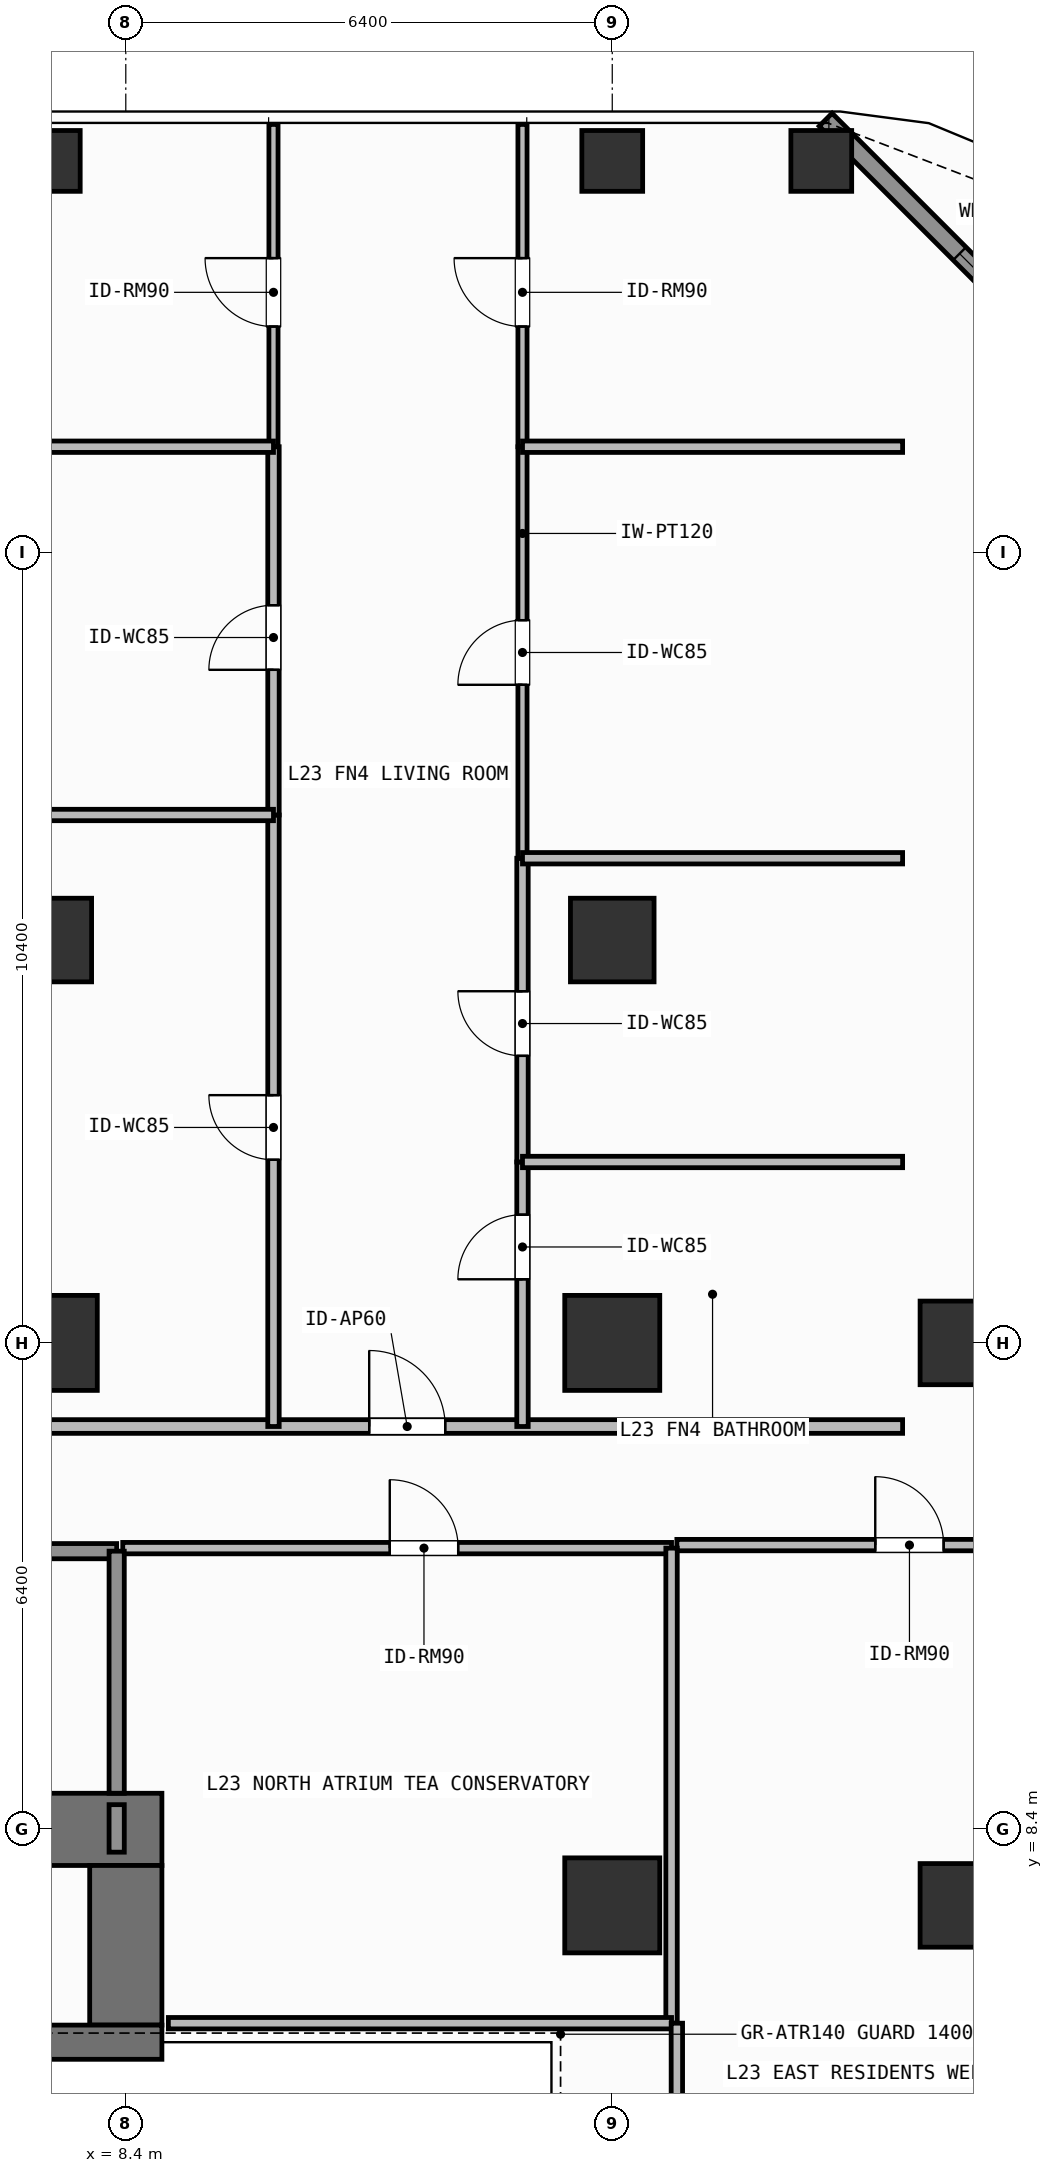
"""IFC4 building model, lengths in metres.
Left out: names, types, materials, properties, quantities, classifications, styles, units other than length and angle.
Written with IfcOpenShell. Run it as: python <this file> out.ifc"""

import sys

from ifc_helpers import new_model, si_unit, direction, frame, frame_2d, origin, origin_2d, place, context, subcontext, project, spatial, rectangle, hollow_rectangle, extrude, element, fill, save


model = new_model("IFC4")
c1 = context("Model", 3, precision=1e-05, world=origin(), true_north=direction((0.0, 1.0)))
c2 = subcontext(c1, "Body", "Model", "MODEL_VIEW")
j1 = project(units=[si_unit("LENGTHUNIT", "METRE"), si_unit("PLANEANGLEUNIT", "RADIAN")], contexts=[c1])
p1 = place(None, origin())
s1 = spatial("IfcSite", under=j1, at=p1, CompositionType="ELEMENT")
p2 = place(p1, origin())
s2 = spatial("IfcBuilding", under=s1, at=p2, CompositionType="ELEMENT")
p3 = place(p2, frame((0.0, 0.0, 93.0)))
s3 = spatial("IfcBuildingStorey", under=s2, at=p3, CompositionType="ELEMENT", Elevation=93.0)
p4 = place(p3, frame((-7.55, 8.4, 0.0), z_axis=(0.0, 0.0, 1.0), x_axis=(1.0, 0.0, 0.0)))
e1 = element("IfcWall", 1, at=p4, inside=s3, PredefinedType="SHEAR", context=c2, shape_type="SweptSolid", body=[
    extrude(rectangle(XDim=16.425, YDim=0.95, at=frame_2d((8.212, 0.0))), origin(), (0.0, 0.0, 1.0), 3.9),
])
p5 = place(p3, frame((8.4, 5.825, 0.0), z_axis=(0.0, 0.0, 1.0), x_axis=(0.0, 1.0, 0.0)))
e2 = element("IfcWall", 2, at=p5, inside=s3, PredefinedType="SHEAR", context=c2, shape_type="SweptSolid", body=[
    extrude(rectangle(XDim=2.1, YDim=0.95, at=frame_2d((1.05, 0.0))), origin(), (0.0, 0.0, 1.0), 3.9),
])
p6 = place(p3, frame((3.045, 5.6, 0.0), z_axis=(0.0, 0.0, 1.0), x_axis=(1.0, 0.0, 0.0)))
e3 = element("IfcWall", 3, at=p6, inside=s3, PredefinedType="SHEAR", context=c2, shape_type="SweptSolid", body=[
    extrude(rectangle(XDim=5.83, YDim=0.45, at=frame_2d((2.915, 0.0))), origin(), (0.0, 0.0, 1.0), 3.9),
])
for number, where, z_axis, x_axis in (
    (4, (7.4, 14.8, 0.0), (0.0, 0.0, 1.0), (1.0, 0.0, 0.0)),
    (5, (14.8, 14.8, 0.0), (0.0, 0.0, 1.0), (1.0, 0.0, 0.0)),
    (6, (14.8, 7.4, 0.0), (0.0, 0.0, 1.0), (1.0, 0.0, 0.0)),
):
    element("IfcColumn", number, at=place(p3, frame(where, z_axis=z_axis, x_axis=x_axis)), inside=s3, PredefinedType="COLUMN", context=c2, shape_type="SweptSolid", body=[
        extrude(rectangle(XDim=1.25, YDim=1.25, at=origin_2d()), origin(), (0.0, 0.0, 1.0), 3.9),
    ])
for number, where, z_axis, x_axis in (
    (7, (19.4, 7.4, 0.0), (0.0, 0.0, 1.0), (1.0, 0.0, 0.0)),
    (8, (19.4, 14.8, 0.0), (0.0, 0.0, 1.0), (1.0, 0.0, 0.0)),
    (9, (7.4, 20.1, 0.0), (0.0, 0.0, 1.0), (1.0, 0.0, 0.0)),
    (10, (14.8, 20.1, 0.0), (0.0, 0.0, 1.0), (1.0, 0.0, 0.0)),
):
    element("IfcColumn", number, at=place(p3, frame(where, z_axis=z_axis, x_axis=x_axis)), inside=s3, PredefinedType="COLUMN", context=c2, shape_type="SweptSolid", body=[
        extrude(rectangle(XDim=1.1, YDim=1.1, at=origin_2d()), origin(), (0.0, 0.0, 1.0), 3.9),
    ])
for number, where, z_axis, x_axis in (
    (11, (17.55, 30.35, 0.0), (0.0, 0.0, 1.0), (1.0, 0.0, 0.0)),
    (12, (7.4, 30.35, 0.0), (0.0, 0.0, 1.0), (1.0, 0.0, 0.0)),
    (13, (14.8, 30.35, 0.0), (0.0, 0.0, 1.0), (1.0, 0.0, 0.0)),
):
    element("IfcColumn", number, at=place(p3, frame(where, z_axis=z_axis, x_axis=x_axis)), inside=s3, PredefinedType="COLUMN", context=c2, shape_type="SweptSolid", body=[
        extrude(hollow_rectangle(XDim=0.8, YDim=0.8, WallThickness=0.036, at=origin_2d()), origin(), (0.0, 0.0, 1.0), 3.9),
    ])
p7 = place(p3, frame((17.608, 30.892, 0.0), z_axis=(0.0, 0.0, 1.0), x_axis=(0.707106781187, -0.707106781187, 0.0)))
e14 = element("IfcWall", 14, at=p7, inside=s3, PredefinedType="SOLIDWALL", context=c2, shape_type="SweptSolid", body=[
    extrude(rectangle(XDim=6.484, YDim=0.24, at=frame_2d((3.242, 0.0))), origin(), (0.0, 0.0, 1.0), 3.68),
])
p8 = place(p7, frame((2.492, 0.0, 0.8)))
e15 = element("IfcOpeningElement", 15, at=p8, cuts=e14, PredefinedType="OPENING", context=c2, shape_type="SweptSolid", body=[
    extrude(rectangle(XDim=1.5, YDim=1.85, at=frame_2d((0.75, 0.925))), frame((0.0, 0.13, 0.0), z_axis=(0.0, -1.0, 0.0), x_axis=(1.0, 0.0, 0.0)), (0.0, 0.0, 1.0), 0.26),
])
p9 = place(p3, frame((4.58, 12.06, 0.0), z_axis=(0.0, 0.0, 1.0), x_axis=(1.0, 0.0, 0.0)))
e16 = element("IfcWall", 16, at=p9, inside=s3, PredefinedType="SOLIDWALL", context=c2, shape_type="SweptSolid", body=[
    extrude(rectangle(XDim=3.7, YDim=0.2, at=frame_2d((1.85, 0.0))), origin(), (0.0, 0.0, 1.0), 3.68),
])
p10 = place(p9, frame((1.212, 0.0, 0.0)))
e17 = element("IfcOpeningElement", 17, at=p10, cuts=e16, PredefinedType="OPENING", context=c2, shape_type="SweptSolid", body=[
    extrude(rectangle(XDim=1.1, YDim=2.15, at=frame_2d((0.55, 1.075))), frame((0.0, 0.11, 0.0), z_axis=(0.0, -1.0, 0.0), x_axis=(1.0, 0.0, 0.0)), (0.0, 0.0, 1.0), 0.22),
])
p11 = place(p3, frame((8.36, 12.1, 0.0), z_axis=(0.0, 0.0, 1.0), x_axis=(1.0, 0.0, 0.0)))
e18 = element("IfcWall", 18, at=p11, inside=s3, PredefinedType="PARTITIONING", context=c2, shape_type="SweptSolid", body=[
    extrude(rectangle(XDim=7.22, YDim=0.15, at=frame_2d((3.61, 0.0))), origin(), (0.0, 0.0, 1.0), 3.68),
])
p12 = place(p11, frame((3.513, 0.0, 0.0)))
e19 = element("IfcOpeningElement", 19, at=p12, cuts=e18, PredefinedType="OPENING", context=c2, shape_type="SweptSolid", body=[
    extrude(rectangle(XDim=0.9, YDim=2.1, at=frame_2d((0.45, 1.05))), frame((0.0, 0.085, 0.0), z_axis=(0.0, -1.0, 0.0), x_axis=(1.0, 0.0, 0.0)), (0.0, 0.0, 1.0), 0.17),
])
p13 = place(p3, frame((6.117, 13.7, 0.0), z_axis=(0.0, 0.0, 1.0), x_axis=(1.0, 0.0, 0.0)))
e20 = element("IfcWall", 20, at=p13, inside=s3, PredefinedType="PARTITIONING", context=c2, shape_type="SweptSolid", body=[
    extrude(rectangle(XDim=12.503, YDim=0.18, at=frame_2d((6.251, 0.0))), origin(), (0.0, 0.0, 1.0), 3.68),
])
p14 = place(p13, frame((5.485, 0.0, 0.0)))
e21 = element("IfcOpeningElement", 21, at=p14, cuts=e20, PredefinedType="OPENING", context=c2, shape_type="SweptSolid", body=[
    extrude(rectangle(XDim=1.0, YDim=2.2, at=frame_2d((0.5, 1.1))), frame((0.0, 0.1, 0.0), z_axis=(0.0, -1.0, 0.0), x_axis=(1.0, 0.0, 0.0)), (0.0, 0.0, 1.0), 0.2),
])
p15 = place(p3, frame((10.343, 13.7, 0.0), z_axis=(0.0, 0.0, 1.0), x_axis=(0.0, 1.0, 0.0)))
e22 = element("IfcWall", 22, at=p15, inside=s3, PredefinedType="PARTITIONING", context=c2, shape_type="SweptSolid", body=[
    extrude(rectangle(XDim=8.045, YDim=0.15, at=frame_2d((4.022, 0.0))), origin(), (0.0, 0.0, 1.0), 3.68),
])
p16 = place(p15, frame((3.51, 0.0, 0.0)))
e23 = element("IfcOpeningElement", 23, at=p16, cuts=e22, PredefinedType="OPENING", context=c2, shape_type="SweptSolid", body=[
    extrude(rectangle(XDim=0.85, YDim=2.1, at=frame_2d((0.425, 1.05))), frame((0.0, 0.085, 0.0), z_axis=(0.0, -1.0, 0.0), x_axis=(1.0, 0.0, 0.0)), (0.0, 0.0, 1.0), 0.17),
])
p17 = place(p3, frame((10.343, 21.745, 0.0), z_axis=(0.0, 0.0, 1.0), x_axis=(0.0, 1.0, 0.0)))
e24 = element("IfcWall", 24, at=p17, inside=s3, PredefinedType="PARTITIONING", context=c2, shape_type="SweptSolid", body=[
    extrude(rectangle(XDim=4.845, YDim=0.15, at=frame_2d((2.422, 0.0))), origin(), (0.0, 0.0, 1.0), 3.68),
])
p18 = place(p17, frame((1.91, 0.0, 0.0)))
e25 = element("IfcOpeningElement", 25, at=p18, cuts=e24, PredefinedType="OPENING", context=c2, shape_type="SweptSolid", body=[
    extrude(rectangle(XDim=0.85, YDim=2.1, at=frame_2d((0.425, 1.05))), frame((0.0, 0.085, 0.0), z_axis=(0.0, -1.0, 0.0), x_axis=(1.0, 0.0, 0.0)), (0.0, 0.0, 1.0), 0.17),
])
p19 = place(p3, frame((10.343, 26.59, 0.0), z_axis=(0.0, 0.0, 1.0), x_axis=(0.0, 1.0, 0.0)))
e26 = element("IfcWall", 26, at=p19, inside=s3, PredefinedType="PARTITIONING", context=c2, shape_type="SweptSolid", body=[
    extrude(rectangle(XDim=4.24, YDim=0.12, at=frame_2d((2.12, 0.0))), origin(), (0.0, 0.0, 1.0), 3.68),
])
p20 = place(p19, frame((1.581, 0.0, 0.0)))
e27 = element("IfcOpeningElement", 27, at=p20, cuts=e26, PredefinedType="OPENING", context=c2, shape_type="SweptSolid", body=[
    extrude(rectangle(XDim=0.9, YDim=2.1, at=frame_2d((0.45, 1.05))), frame((0.0, 0.07, 0.0), z_axis=(0.0, -1.0, 0.0), x_axis=(1.0, 0.0, 0.0)), (0.0, 0.0, 1.0), 0.14),
])
p21 = place(p3, frame((13.619, 13.7, 0.0), z_axis=(0.0, 0.0, 1.0), x_axis=(0.0, 1.0, 0.0)))
e28 = element("IfcWall", 28, at=p21, inside=s3, PredefinedType="PARTITIONING", context=c2, shape_type="SweptSolid", body=[
    extrude(rectangle(XDim=3.48, YDim=0.15, at=frame_2d((1.74, 0.0))), origin(), (0.0, 0.0, 1.0), 3.68),
])
p22 = place(p21, frame((1.937, 0.0, 0.0)))
e29 = element("IfcOpeningElement", 29, at=p22, cuts=e28, PredefinedType="OPENING", context=c2, shape_type="SweptSolid", body=[
    extrude(rectangle(XDim=0.85, YDim=2.1, at=frame_2d((0.425, 1.05))), frame((0.0, 0.085, 0.0), z_axis=(0.0, -1.0, 0.0), x_axis=(1.0, 0.0, 0.0)), (0.0, 0.0, 1.0), 0.17),
])
p23 = place(p3, frame((13.619, 17.18, 0.0), z_axis=(0.0, 0.0, 1.0), x_axis=(0.0, 1.0, 0.0)))
e30 = element("IfcWall", 30, at=p23, inside=s3, PredefinedType="PARTITIONING", context=c2, shape_type="SweptSolid", body=[
    extrude(rectangle(XDim=3.996, YDim=0.15, at=frame_2d((1.998, 0.0))), origin(), (0.0, 0.0, 1.0), 3.68),
])
p24 = place(p23, frame((1.396, 0.0, 0.0)))
e31 = element("IfcOpeningElement", 31, at=p24, cuts=e30, PredefinedType="OPENING", context=c2, shape_type="SweptSolid", body=[
    extrude(rectangle(XDim=0.85, YDim=2.1, at=frame_2d((0.425, 1.05))), frame((0.0, 0.085, 0.0), z_axis=(0.0, -1.0, 0.0), x_axis=(1.0, 0.0, 0.0)), (0.0, 0.0, 1.0), 0.17),
])
p25 = place(p3, frame((13.619, 21.176, 0.0), z_axis=(0.0, 0.0, 1.0), x_axis=(0.0, 1.0, 0.0)))
e32 = element("IfcWall", 32, at=p25, inside=s3, PredefinedType="PARTITIONING", context=c2, shape_type="SweptSolid", body=[
    extrude(rectangle(XDim=5.414, YDim=0.12, at=frame_2d((2.707, 0.0))), origin(), (0.0, 0.0, 1.0), 3.68),
])
p26 = place(p25, frame((2.282, 0.0, 0.0)))
e33 = element("IfcOpeningElement", 33, at=p26, cuts=e32, PredefinedType="OPENING", context=c2, shape_type="SweptSolid", body=[
    extrude(rectangle(XDim=0.85, YDim=2.1, at=frame_2d((0.425, 1.05))), frame((0.0, 0.07, 0.0), z_axis=(0.0, -1.0, 0.0), x_axis=(1.0, 0.0, 0.0)), (0.0, 0.0, 1.0), 0.14),
])
p27 = place(p3, frame((13.619, 26.59, 0.0), z_axis=(0.0, 0.0, 1.0), x_axis=(0.0, 1.0, 0.0)))
e34 = element("IfcWall", 34, at=p27, inside=s3, PredefinedType="PARTITIONING", context=c2, shape_type="SweptSolid", body=[
    extrude(rectangle(XDim=4.24, YDim=0.12, at=frame_2d((2.12, 0.0))), origin(), (0.0, 0.0, 1.0), 3.68),
])
p28 = place(p27, frame((1.581, 0.0, 0.0)))
e35 = element("IfcOpeningElement", 35, at=p28, cuts=e34, PredefinedType="OPENING", context=c2, shape_type="SweptSolid", body=[
    extrude(rectangle(XDim=0.9, YDim=2.1, at=frame_2d((0.45, 1.05))), frame((0.0, 0.07, 0.0), z_axis=(0.0, -1.0, 0.0), x_axis=(1.0, 0.0, 0.0)), (0.0, 0.0, 1.0), 0.14),
])
p29 = place(p3, frame((15.65, 12.14, 0.0), z_axis=(0.0, 0.0, 1.0), x_axis=(1.0, 0.0, 0.0)))
e36 = element("IfcWall", 36, at=p29, inside=s3, PredefinedType="PARTITIONING", context=c2, shape_type="SweptSolid", body=[
    extrude(rectangle(XDim=6.47, YDim=0.15, at=frame_2d((3.235, 0.0))), origin(), (0.0, 0.0, 1.0), 3.68),
])
p30 = place(p29, frame((2.61, 0.0, 0.0)))
e37 = element("IfcOpeningElement", 37, at=p30, cuts=e36, PredefinedType="OPENING", context=c2, shape_type="SweptSolid", body=[
    extrude(rectangle(XDim=0.9, YDim=2.1, at=frame_2d((0.45, 1.05))), frame((0.0, 0.085, 0.0), z_axis=(0.0, -1.0, 0.0), x_axis=(1.0, 0.0, 0.0)), (0.0, 0.0, 1.0), 0.17),
])
p31 = place(p3, frame((8.28, 8.875, 0.0), z_axis=(0.0, 0.0, 1.0), x_axis=(0.0, 1.0, 0.0)))
e38 = element("IfcWall", 38, at=p31, inside=s3, PredefinedType="SOLIDWALL", context=c2, shape_type="SweptSolid", body=[
    extrude(rectangle(XDim=3.185, YDim=0.2, at=frame_2d((1.593, 0.0))), origin(), (0.0, 0.0, 1.0), 3.68),
])
p32 = place(p3, frame((8.28, 8.1, 0.0), z_axis=(0.0, 0.0, 1.0), x_axis=(0.0, 1.0, 0.0)))
e39 = element("IfcWall", 39, at=p32, inside=s3, PredefinedType="SOLIDWALL", context=c2, shape_type="SweptSolid", body=[
    extrude(rectangle(XDim=0.625, YDim=0.2, at=frame_2d((0.312, 0.0))), origin(), (0.0, 0.0, 1.0), 3.68),
])
p33 = place(p3, frame((15.58, 5.85, 0.0), z_axis=(0.0, 0.0, 1.0), x_axis=(0.0, 1.0, 0.0)))
e40 = element("IfcWall", 40, at=p33, inside=s3, PredefinedType="PARTITIONING", context=c2, shape_type="SweptSolid", body=[
    extrude(rectangle(XDim=6.25, YDim=0.15, at=frame_2d((3.125, 0.0))), origin(), (0.0, 0.0, 1.0), 3.68),
])
p34 = place(p3, frame((8.96, 5.85, 0.0), z_axis=(0.0, 0.0, 1.0), x_axis=(1.0, 0.0, 0.0)))
e41 = element("IfcWall", 41, at=p34, inside=s3, PredefinedType="PARTITIONING", context=c2, shape_type="SweptSolid", body=[
    extrude(rectangle(XDim=6.62, YDim=0.15, at=frame_2d((3.31, 0.0))), origin(), (0.0, 0.0, 1.0), 3.68),
])
for number, where, z_axis, x_axis in (
    (42, (6.117, 21.745, 0.0), (0.0, 0.0, 1.0), (1.0, 0.0, 0.0)),
    (43, (6.117, 26.59, 0.0), (0.0, 0.0, 1.0), (1.0, 0.0, 0.0)),
):
    element("IfcWall", number, at=place(p3, frame(where, z_axis=z_axis, x_axis=x_axis)), inside=s3, PredefinedType="PARTITIONING", context=c2, shape_type="SweptSolid", body=[
        extrude(rectangle(XDim=4.226, YDim=0.15, at=frame_2d((2.113, 0.0))), origin(), (0.0, 0.0, 1.0), 3.68),
    ])
for number, where, z_axis, x_axis in (
    (44, (13.619, 17.18, 0.0), (0.0, 0.0, 1.0), (1.0, 0.0, 0.0)),
    (45, (13.619, 21.176, 0.0), (0.0, 0.0, 1.0), (1.0, 0.0, 0.0)),
    (46, (13.619, 26.59, 0.0), (0.0, 0.0, 1.0), (1.0, 0.0, 0.0)),
):
    element("IfcWall", number, at=place(p3, frame(where, z_axis=z_axis, x_axis=x_axis)), inside=s3, PredefinedType="PARTITIONING", context=c2, shape_type="SweptSolid", body=[
        extrude(rectangle(XDim=5.001, YDim=0.15, at=frame_2d((2.5, 0.0))), origin(), (0.0, 0.0, 1.0), 3.68),
    ])
p35 = place(p3, frame((15.65, -1.8, 0.0), z_axis=(0.0, 0.0, 1.0), x_axis=(0.0, 1.0, 0.0)))
e47 = element("IfcWall", 47, at=p35, inside=s3, PredefinedType="PARTITIONING", context=c2, shape_type="SweptSolid", body=[
    extrude(rectangle(XDim=7.65, YDim=0.15, at=frame_2d((3.825, 0.0))), origin(), (0.0, 0.0, 1.0), 3.68),
])
p36 = place(p8, origin())
e48 = element("IfcWindow", 48, at=p36, inside=s3, PartitioningType="SINGLE_PANEL", PredefinedType="WINDOW", context=c2, shape_type="SweptSolid", body=[
    extrude(rectangle(XDim=1.5, YDim=1.85, at=frame_2d((0.75, 0.925))), frame((0.0, 0.03, 0.0), z_axis=(0.0, -1.0, 0.0), x_axis=(1.0, 0.0, 0.0)), (0.0, 0.0, 1.0), 0.06),
])
fill(e15, e48)
p37 = place(p12, origin())
e49 = element("IfcDoor", 49, at=p37, inside=s3, OperationType="SINGLE_SWING_LEFT", PredefinedType="DOOR", context=c2, shape_type="SweptSolid", body=[
    extrude(rectangle(XDim=0.9, YDim=2.1, at=frame_2d((0.45, 1.05))), frame((0.0, 0.025, 0.0), z_axis=(0.0, -1.0, 0.0), x_axis=(1.0, 0.0, 0.0)), (0.0, 0.0, 1.0), 0.05),
])
fill(e19, e49)
p38 = place(p14, origin())
e50 = element("IfcDoor", 50, at=p38, inside=s3, OperationType="SINGLE_SWING_LEFT", PredefinedType="DOOR", context=c2, shape_type="SweptSolid", body=[
    extrude(rectangle(XDim=1.0, YDim=2.2, at=frame_2d((0.5, 1.1))), frame((0.0, 0.025, 0.0), z_axis=(0.0, -1.0, 0.0), x_axis=(1.0, 0.0, 0.0)), (0.0, 0.0, 1.0), 0.05),
])
fill(e21, e50)
p39 = place(p16, origin())
e51 = element("IfcDoor", 51, at=p39, inside=s3, OperationType="SINGLE_SWING_RIGHT", PredefinedType="DOOR", context=c2, shape_type="SweptSolid", body=[
    extrude(rectangle(XDim=0.85, YDim=2.1, at=frame_2d((0.425, 1.05))), frame((0.0, 0.025, 0.0), z_axis=(0.0, -1.0, 0.0), x_axis=(1.0, 0.0, 0.0)), (0.0, 0.0, 1.0), 0.05),
])
fill(e23, e51)
p40 = place(p18, origin())
e52 = element("IfcDoor", 52, at=p40, inside=s3, OperationType="SINGLE_SWING_LEFT", PredefinedType="DOOR", context=c2, shape_type="SweptSolid", body=[
    extrude(rectangle(XDim=0.85, YDim=2.1, at=frame_2d((0.425, 1.05))), frame((0.0, 0.025, 0.0), z_axis=(0.0, -1.0, 0.0), x_axis=(1.0, 0.0, 0.0)), (0.0, 0.0, 1.0), 0.05),
])
fill(e25, e52)
p41 = place(p20, origin())
e53 = element("IfcDoor", 53, at=p41, inside=s3, OperationType="SINGLE_SWING_RIGHT", PredefinedType="DOOR", context=c2, shape_type="SweptSolid", body=[
    extrude(rectangle(XDim=0.9, YDim=2.1, at=frame_2d((0.45, 1.05))), frame((0.0, 0.025, 0.0), z_axis=(0.0, -1.0, 0.0), x_axis=(1.0, 0.0, 0.0)), (0.0, 0.0, 1.0), 0.05),
])
fill(e27, e53)
p42 = place(p22, origin())
e54 = element("IfcDoor", 54, at=p42, inside=s3, OperationType="SINGLE_SWING_LEFT", PredefinedType="DOOR", context=c2, shape_type="SweptSolid", body=[
    extrude(rectangle(XDim=0.85, YDim=2.1, at=frame_2d((0.425, 1.05))), frame((0.0, 0.025, 0.0), z_axis=(0.0, -1.0, 0.0), x_axis=(1.0, 0.0, 0.0)), (0.0, 0.0, 1.0), 0.05),
])
fill(e29, e54)
p43 = place(p24, origin())
e55 = element("IfcDoor", 55, at=p43, inside=s3, OperationType="SINGLE_SWING_RIGHT", PredefinedType="DOOR", context=c2, shape_type="SweptSolid", body=[
    extrude(rectangle(XDim=0.85, YDim=2.1, at=frame_2d((0.425, 1.05))), frame((0.0, 0.025, 0.0), z_axis=(0.0, -1.0, 0.0), x_axis=(1.0, 0.0, 0.0)), (0.0, 0.0, 1.0), 0.05),
])
fill(e31, e55)
p44 = place(p26, origin())
e56 = element("IfcDoor", 56, at=p44, inside=s3, OperationType="SINGLE_SWING_LEFT", PredefinedType="DOOR", context=c2, shape_type="SweptSolid", body=[
    extrude(rectangle(XDim=0.85, YDim=2.1, at=frame_2d((0.425, 1.05))), frame((0.0, 0.025, 0.0), z_axis=(0.0, -1.0, 0.0), x_axis=(1.0, 0.0, 0.0)), (0.0, 0.0, 1.0), 0.05),
])
fill(e33, e56)
p45 = place(p28, origin())
e57 = element("IfcDoor", 57, at=p45, inside=s3, OperationType="SINGLE_SWING_RIGHT", PredefinedType="DOOR", context=c2, shape_type="SweptSolid", body=[
    extrude(rectangle(XDim=0.9, YDim=2.1, at=frame_2d((0.45, 1.05))), frame((0.0, 0.025, 0.0), z_axis=(0.0, -1.0, 0.0), x_axis=(1.0, 0.0, 0.0)), (0.0, 0.0, 1.0), 0.05),
])
fill(e35, e57)
p46 = place(p30, origin())
e58 = element("IfcDoor", 58, at=p46, inside=s3, OperationType="SINGLE_SWING_LEFT", PredefinedType="DOOR", context=c2, shape_type="SweptSolid", body=[
    extrude(rectangle(XDim=0.9, YDim=2.1, at=frame_2d((0.45, 1.05))), frame((0.0, 0.025, 0.0), z_axis=(0.0, -1.0, 0.0), x_axis=(1.0, 0.0, 0.0)), (0.0, 0.0, 1.0), 0.05),
])
fill(e37, e58)
save(model, sys.argv[1])
